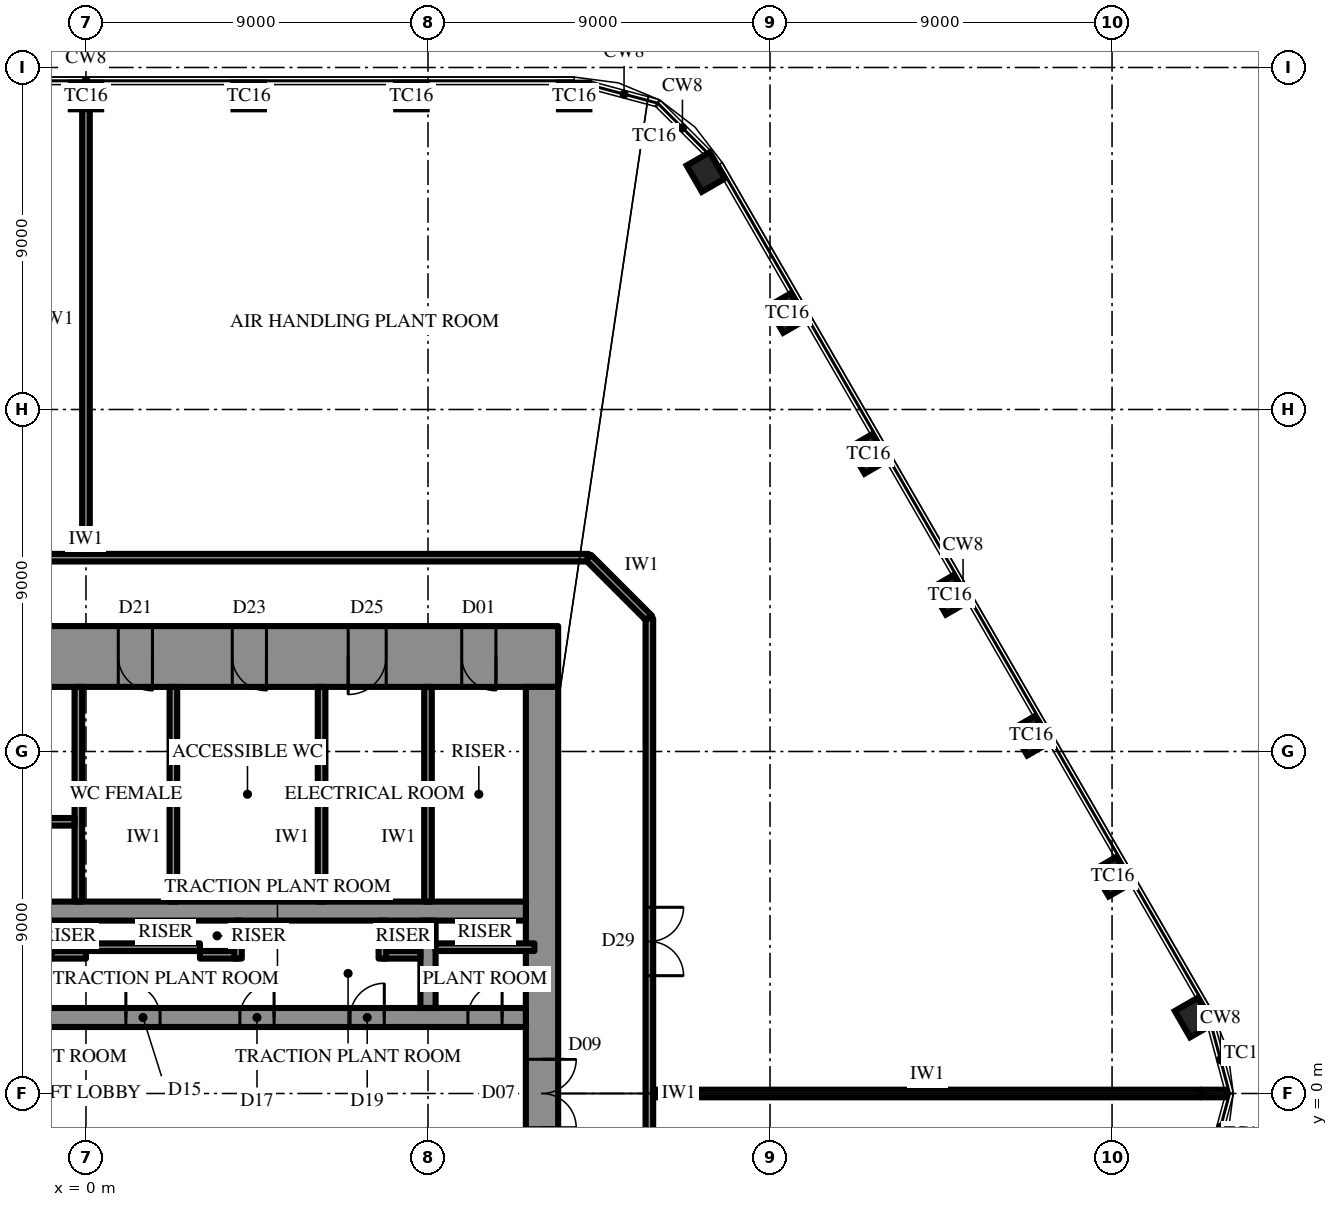
"""IFC4 building model, lengths in metres.
Left out: names, types, materials, properties, quantities, classifications, styles, units other than length and angle.
Written with IfcOpenShell. Run it as: python <this file> out.ifc"""

import sys

from ifc_helpers import new_model, si_unit, direction, frame, frame_2d, origin, origin_2d, place, context, subcontext, project, spatial, rectangle, extrude, element, fill, save


model = new_model("IFC4")
c1 = context("Model", 3, precision=1e-05, world=origin(), true_north=direction((0.0, 1.0)))
c2 = subcontext(c1, "Body", "Model", "MODEL_VIEW")
j1 = project(units=[si_unit("LENGTHUNIT", "METRE"), si_unit("PLANEANGLEUNIT", "RADIAN")], contexts=[c1])
p1 = place(None, origin())
s1 = spatial("IfcSite", under=j1, at=p1, CompositionType="ELEMENT")
p2 = place(p1, origin())
s2 = spatial("IfcBuilding", under=s1, at=p2, CompositionType="ELEMENT")
p3 = place(p2, frame((0.0, 0.0, 396.3)))
s3 = spatial("IfcBuildingStorey", under=s2, at=p3, CompositionType="ELEMENT", Elevation=396.3)
for number, where, z_axis, x_axis in (
    (1, (29.156, 2.0, 0.0), (0.0, 0.0, 1.0), (-0.5, 0.866, 0.0)),
    (2, (27.015, 5.708, 0.0), (0.0, 0.0, 1.0), (-0.5, 0.866, 0.0)),
    (3, (24.874, 9.417, 0.0), (0.0, 0.0, 1.0), (-0.5, 0.866, 0.0)),
    (4, (22.733, 13.125, 0.0), (0.0, 0.0, 1.0), (-0.5, 0.866, 0.0)),
    (5, (20.592, 16.833, 0.0), (0.0, 0.0, 1.0), (-0.5, 0.866, 0.0)),
    (6, (18.451, 20.542, 0.0), (0.0, 0.0, 1.0), (-0.5, 0.866, 0.0)),
    (7, (16.31, 24.25, 0.0), (0.0, 0.0, 1.0), (-0.5, 0.866, 0.0)),
    (8, (12.846, 26.25, 0.0), (0.0, 0.0, 1.0), (-1.0, 0.0, 0.0)),
    (9, (8.564, 26.25, 0.0), (0.0, 0.0, 1.0), (-1.0, 0.0, 0.0)),
    (10, (4.282, 26.25, 0.0), (0.0, 0.0, 1.0), (-1.0, 0.0, 0.0)),
    (11, (0.0, 26.25, 0.0), (0.0, 0.0, 1.0), (-1.0, 0.0, 0.0)),
):
    element("IfcColumn", number, at=place(p3, frame(where, z_axis=z_axis, x_axis=x_axis)), inside=s3, PredefinedType="COLUMN", context=c2, shape_type="SweptSolid", body=[
        extrude(rectangle(XDim=0.8, YDim=0.7, at=origin_2d()), origin(), (0.0, 0.0, 1.0), 6.0),
    ])
p4 = place(p3, frame((-12.425, 11.5, 0.0), z_axis=(0.0, 0.0, 1.0), x_axis=(1.0, 0.0, 0.0)))
e12 = element("IfcWall", 12, at=p4, inside=s3, PredefinedType="SHEAR", context=c2, shape_type="SweptSolid", body=[
    extrude(rectangle(XDim=24.85, YDim=1.6, at=frame_2d((12.425, 0.0))), origin(), (0.0, 0.0, 1.0), 6.0),
])
p5 = place(p4, frame((13.275, 0.0, 0.0)))
e13 = element("IfcOpeningElement", 13, at=p5, cuts=e12, PredefinedType="OPENING", context=c2, shape_type="SweptSolid", body=[
    extrude(rectangle(XDim=0.9, YDim=2.2, at=frame_2d((0.45, 1.1))), frame((0.0, 0.81, 0.0), z_axis=(0.0, -1.0, 0.0), x_axis=(1.0, 0.0, 0.0)), (0.0, 0.0, 1.0), 1.62),
])
p6 = place(p4, frame((16.275, 0.0, 0.0)))
e14 = element("IfcOpeningElement", 14, at=p6, cuts=e12, PredefinedType="OPENING", context=c2, shape_type="SweptSolid", body=[
    extrude(rectangle(XDim=0.9, YDim=2.2, at=frame_2d((0.45, 1.1))), frame((0.0, 0.81, 0.0), z_axis=(0.0, -1.0, 0.0), x_axis=(1.0, 0.0, 0.0)), (0.0, 0.0, 1.0), 1.62),
])
p7 = place(p4, frame((19.325, 0.0, 0.0)))
e15 = element("IfcOpeningElement", 15, at=p7, cuts=e12, PredefinedType="OPENING", context=c2, shape_type="SweptSolid", body=[
    extrude(rectangle(XDim=1.0, YDim=2.2, at=frame_2d((0.5, 1.1))), frame((0.0, 0.81, 0.0), z_axis=(0.0, -1.0, 0.0), x_axis=(1.0, 0.0, 0.0)), (0.0, 0.0, 1.0), 1.62),
])
p8 = place(p4, frame((1.637, 0.0, 0.0)))
e16 = element("IfcOpeningElement", 16, at=p8, cuts=e12, PredefinedType="OPENING", context=c2, shape_type="SweptSolid", body=[
    extrude(rectangle(XDim=0.9, YDim=2.2, at=frame_2d((0.45, 1.1))), frame((0.0, 0.81, 0.0), z_axis=(0.0, -1.0, 0.0), x_axis=(1.0, 0.0, 0.0)), (0.0, 0.0, 1.0), 1.62),
])
p9 = place(p4, frame((22.312, 0.0, 0.0)))
e17 = element("IfcOpeningElement", 17, at=p9, cuts=e12, PredefinedType="OPENING", context=c2, shape_type="SweptSolid", body=[
    extrude(rectangle(XDim=0.9, YDim=2.2, at=frame_2d((0.45, 1.1))), frame((0.0, 0.81, 0.0), z_axis=(0.0, -1.0, 0.0), x_axis=(1.0, 0.0, 0.0)), (0.0, 0.0, 1.0), 1.62),
])
p10 = place(p3, frame((12.0, -10.7, 0.0), z_axis=(0.0, 0.0, 1.0), x_axis=(0.0, 1.0, 0.0)))
e18 = element("IfcWall", 18, at=p10, inside=s3, PredefinedType="SHEAR", context=c2, shape_type="SweptSolid", body=[
    extrude(rectangle(XDim=21.4, YDim=0.85, at=frame_2d((10.7, 0.0))), origin(), (0.0, 0.0, 1.0), 6.0),
])
p11 = place(p10, frame((9.8, 0.0, 0.0)))
e19 = element("IfcOpeningElement", 19, at=p11, cuts=e18, PredefinedType="OPENING", context=c2, shape_type="SweptSolid", body=[
    extrude(rectangle(XDim=1.8, YDim=2.4, at=frame_2d((0.9, 1.2))), frame((0.0, 0.435, 0.0), z_axis=(0.0, -1.0, 0.0), x_axis=(1.0, 0.0, 0.0)), (0.0, 0.0, 1.0), 0.87),
])
p12 = place(p3, frame((-3.2, 2.0, 0.0), z_axis=(0.0, 0.0, 1.0), x_axis=(1.0, 0.0, 0.0)))
e20 = element("IfcWall", 20, at=p12, inside=s3, PredefinedType="SHEAR", context=c2, shape_type="SweptSolid", body=[
    extrude(rectangle(XDim=14.775, YDim=0.5, at=frame_2d((7.387, 0.0))), origin(), (0.0, 0.0, 1.0), 6.0),
])
p13 = place(p12, frame((1.35, 0.0, 0.0)))
e21 = element("IfcOpeningElement", 21, at=p13, cuts=e20, PredefinedType="OPENING", context=c2, shape_type="SweptSolid", body=[
    extrude(rectangle(XDim=0.9, YDim=2.2, at=frame_2d((0.45, 1.1))), frame((0.0, 0.26, 0.0), z_axis=(0.0, -1.0, 0.0), x_axis=(1.0, 0.0, 0.0)), (0.0, 0.0, 1.0), 0.52),
])
p14 = place(p12, frame((4.25, 0.0, 0.0)))
e22 = element("IfcOpeningElement", 22, at=p14, cuts=e20, PredefinedType="OPENING", context=c2, shape_type="SweptSolid", body=[
    extrude(rectangle(XDim=0.9, YDim=2.2, at=frame_2d((0.45, 1.1))), frame((0.0, 0.26, 0.0), z_axis=(0.0, -1.0, 0.0), x_axis=(1.0, 0.0, 0.0)), (0.0, 0.0, 1.0), 0.52),
])
p15 = place(p12, frame((7.25, 0.0, 0.0)))
e23 = element("IfcOpeningElement", 23, at=p15, cuts=e20, PredefinedType="OPENING", context=c2, shape_type="SweptSolid", body=[
    extrude(rectangle(XDim=0.9, YDim=2.2, at=frame_2d((0.45, 1.1))), frame((0.0, 0.26, 0.0), z_axis=(0.0, -1.0, 0.0), x_axis=(1.0, 0.0, 0.0)), (0.0, 0.0, 1.0), 0.52),
])
p16 = place(p12, frame((10.15, 0.0, 0.0)))
e24 = element("IfcOpeningElement", 24, at=p16, cuts=e20, PredefinedType="OPENING", context=c2, shape_type="SweptSolid", body=[
    extrude(rectangle(XDim=0.9, YDim=2.2, at=frame_2d((0.45, 1.1))), frame((0.0, 0.26, 0.0), z_axis=(0.0, -1.0, 0.0), x_axis=(1.0, 0.0, 0.0)), (0.0, 0.0, 1.0), 0.52),
])
p17 = place(p12, frame((13.25, 0.0, 0.0)))
e25 = element("IfcOpeningElement", 25, at=p17, cuts=e20, PredefinedType="OPENING", context=c2, shape_type="SweptSolid", body=[
    extrude(rectangle(XDim=0.9, YDim=2.2, at=frame_2d((0.45, 1.1))), frame((0.0, 0.26, 0.0), z_axis=(0.0, -1.0, 0.0), x_axis=(1.0, 0.0, 0.0)), (0.0, 0.0, 1.0), 0.52),
])
p18 = place(p3, frame((-11.575, 4.8, 0.0), z_axis=(0.0, 0.0, 1.0), x_axis=(1.0, 0.0, 0.0)))
e26 = element("IfcWall", 26, at=p18, inside=s3, PredefinedType="SHEAR", context=c2, shape_type="SweptSolid", body=[
    extrude(rectangle(XDim=23.15, YDim=0.5, at=frame_2d((11.575, 0.0))), origin(), (0.0, 0.0, 1.0), 6.0),
])
p19 = place(p18, frame((6.475, 0.0, 0.0)))
e27 = element("IfcOpeningElement", 27, at=p19, cuts=e26, PredefinedType="OPENING", context=c2, shape_type="SweptSolid", body=[
    extrude(rectangle(XDim=1.2, YDim=2.2, at=frame_2d((0.6, 1.1))), frame((0.0, 0.26, 0.0), z_axis=(0.0, -1.0, 0.0), x_axis=(1.0, 0.0, 0.0)), (0.0, 0.0, 1.0), 0.52),
])
p20 = place(p18, frame((3.475, 0.0, 0.0)))
e28 = element("IfcOpeningElement", 28, at=p20, cuts=e26, PredefinedType="OPENING", context=c2, shape_type="SweptSolid", body=[
    extrude(rectangle(XDim=1.2, YDim=2.2, at=frame_2d((0.6, 1.1))), frame((0.0, 0.26, 0.0), z_axis=(0.0, -1.0, 0.0), x_axis=(1.0, 0.0, 0.0)), (0.0, 0.0, 1.0), 0.52),
])
p21 = place(p3, frame((9.0, 2.25, 0.0), z_axis=(0.0, 0.0, 1.0), x_axis=(0.0, 1.0, 0.0)))
e29 = element("IfcWall", 29, at=p21, inside=s3, PredefinedType="SHEAR", context=c2, shape_type="SweptSolid", body=[
    extrude(rectangle(XDim=2.3, YDim=0.4, at=frame_2d((1.15, 0.0))), origin(), (0.0, 0.0, 1.0), 6.0),
])
p22 = place(p3, frame((-0.2, 5.05, 0.0), z_axis=(0.0, 0.0, 1.0), x_axis=(0.0, 1.0, 0.0)))
e30 = element("IfcWall", 30, at=p22, inside=s3, PredefinedType="SHEAR", context=c2, shape_type="SweptSolid", body=[
    extrude(rectangle(XDim=5.65, YDim=0.2, at=frame_2d((2.825, 0.0))), origin(), (0.0, 0.0, 1.0), 6.0),
])
p23 = place(p3, frame((-8.9, 7.15, 0.0), z_axis=(0.0, 0.0, 1.0), x_axis=(1.0, 0.0, 0.0)))
e31 = element("IfcWall", 31, at=p23, inside=s3, PredefinedType="SHEAR", context=c2, shape_type="SweptSolid", body=[
    extrude(rectangle(XDim=8.6, YDim=0.2, at=frame_2d((4.3, 0.0))), origin(), (0.0, 0.0, 1.0), 6.0),
])
p24 = place(p23, frame((0.3, 0.0, 0.0)))
e32 = element("IfcOpeningElement", 32, at=p24, cuts=e31, PredefinedType="OPENING", context=c2, shape_type="SweptSolid", body=[
    extrude(rectangle(XDim=1.0, YDim=2.2, at=frame_2d((0.5, 1.1))), frame((0.0, 0.11, 0.0), z_axis=(0.0, -1.0, 0.0), x_axis=(1.0, 0.0, 0.0)), (0.0, 0.0, 1.0), 0.22),
])
for number, where, z_axis, x_axis in (
    (33, (9.0, 5.05, 0.0), (0.0, 0.0, 1.0), (0.0, 1.0, 0.0)),
    (34, (2.3, 5.05, 0.0), (0.0, 0.0, 1.0), (0.0, 1.0, 0.0)),
    (35, (6.2, 5.05, 0.0), (0.0, 0.0, 1.0), (0.0, 1.0, 0.0)),
):
    element("IfcWall", number, at=place(p3, frame(where, z_axis=z_axis, x_axis=x_axis)), inside=s3, PredefinedType="PARTITIONING", context=c2, shape_type="SweptSolid", body=[
        extrude(rectangle(XDim=5.65, YDim=0.2, at=frame_2d((2.825, 0.0))), origin(), (0.0, 0.0, 1.0), 5.8),
    ])
p25 = place(p3, frame((-1.0, 3.65, 0.0), z_axis=(0.0, 0.0, 1.0), x_axis=(1.0, 0.0, 0.0)))
e36 = element("IfcWall", 36, at=p25, inside=s3, PredefinedType="PARTITIONING", context=c2, shape_type="SweptSolid", body=[
    extrude(rectangle(XDim=1.0, YDim=0.2, at=frame_2d((0.5, 0.0))), origin(), (0.0, 0.0, 1.0), 5.8),
])
p26 = place(p3, frame((0.0, 3.85, 0.0), z_axis=(0.0, 0.0, 1.0), x_axis=(1.0, 0.0, 0.0)))
e37 = element("IfcWall", 37, at=p26, inside=s3, PredefinedType="PARTITIONING", context=c2, shape_type="SweptSolid", body=[
    extrude(rectangle(XDim=3.0, YDim=0.2, at=frame_2d((1.5, 0.0))), origin(), (0.0, 0.0, 1.0), 5.8),
])
for number, where, z_axis, x_axis in (
    (38, (3.0, 3.65, 0.0), (0.0, 0.0, 1.0), (1.0, 0.0, 0.0)),
    (39, (4.0, 3.55, 0.0), (0.0, 0.0, 1.0), (0.0, 1.0, 0.0)),
    (40, (7.8, 3.65, 0.0), (0.0, 0.0, 1.0), (1.0, 0.0, 0.0)),
    (41, (7.8, 3.55, 0.0), (0.0, 0.0, 1.0), (0.0, 1.0, 0.0)),
):
    element("IfcWall", number, at=place(p3, frame(where, z_axis=z_axis, x_axis=x_axis)), inside=s3, PredefinedType="PARTITIONING", context=c2, shape_type="SweptSolid", body=[
        extrude(rectangle(XDim=1.0, YDim=0.2, at=frame_2d((0.5, 0.0))), origin(), (0.0, 0.0, 1.0), 5.8),
    ])
p27 = place(p3, frame((9.2, 3.85, 0.0), z_axis=(0.0, 0.0, 1.0), x_axis=(1.0, 0.0, 0.0)))
e42 = element("IfcWall", 42, at=p27, inside=s3, PredefinedType="PARTITIONING", context=c2, shape_type="SweptSolid", body=[
    extrude(rectangle(XDim=2.6, YDim=0.2, at=frame_2d((1.3, 0.0))), origin(), (0.0, 0.0, 1.0), 5.8),
])
p28 = place(p3, frame((-13.225, 14.1, 0.0), z_axis=(0.0, 0.0, 1.0), x_axis=(1.0, 0.0, 0.0)))
e43 = element("IfcWall", 43, at=p28, inside=s3, PredefinedType="PARTITIONING", context=c2, shape_type="SweptSolid", body=[
    extrude(rectangle(XDim=26.45, YDim=0.2, at=frame_2d((13.225, 0.0))), origin(), (0.0, 0.0, 1.0), 5.8),
])
p29 = place(p28, frame((6.113, 0.0, 0.0)))
e44 = element("IfcOpeningElement", 44, at=p29, cuts=e43, PredefinedType="OPENING", context=c2, shape_type="SweptSolid", body=[
    extrude(rectangle(XDim=1.0, YDim=2.2, at=frame_2d((0.5, 1.1))), frame((0.0, 0.11, 0.0), z_axis=(0.0, -1.0, 0.0), x_axis=(1.0, 0.0, 0.0)), (0.0, 0.0, 1.0), 0.22),
])
p30 = place(p3, frame((13.225, 14.1, 0.0), z_axis=(0.0, 0.0, 1.0), x_axis=(0.707052830339, -0.707160727918, 0.0)))
e45 = element("IfcWall", 45, at=p30, inside=s3, PredefinedType="PARTITIONING", context=c2, shape_type="SweptSolid", body=[
    extrude(rectangle(XDim=2.263, YDim=0.2, at=frame_2d((1.131, 0.0))), origin(), (0.0, 0.0, 1.0), 5.8),
])
p31 = place(p3, frame((14.825, 12.5, 0.0), z_axis=(0.0, 0.0, 1.0), x_axis=(0.0, -1.0, 0.0)))
e46 = element("IfcWall", 46, at=p31, inside=s3, PredefinedType="PARTITIONING", context=c2, shape_type="SweptSolid", body=[
    extrude(rectangle(XDim=25.0, YDim=0.2, at=frame_2d((12.5, 0.0))), origin(), (0.0, 0.0, 1.0), 5.8),
])
p32 = place(p31, frame((7.6, 0.0, 0.0)))
e47 = element("IfcOpeningElement", 47, at=p32, cuts=e46, PredefinedType="OPENING", context=c2, shape_type="SweptSolid", body=[
    extrude(rectangle(XDim=1.8, YDim=2.4, at=frame_2d((0.9, 1.2))), frame((0.0, 0.11, 0.0), z_axis=(0.0, -1.0, 0.0), x_axis=(1.0, 0.0, 0.0)), (0.0, 0.0, 1.0), 0.22),
])
p33 = place(p31, frame((15.6, 0.0, 0.0)))
e48 = element("IfcOpeningElement", 48, at=p33, cuts=e46, PredefinedType="OPENING", context=c2, shape_type="SweptSolid", body=[
    extrude(rectangle(XDim=1.8, YDim=2.4, at=frame_2d((0.9, 1.2))), frame((0.0, 0.11, 0.0), z_axis=(0.0, -1.0, 0.0), x_axis=(1.0, 0.0, 0.0)), (0.0, 0.0, 1.0), 0.22),
])
p34 = place(p3, frame((0.0, 14.2, 0.0), z_axis=(0.0, 0.0, 1.0), x_axis=(0.0, 1.0, 0.0)))
e49 = element("IfcWall", 49, at=p34, inside=s3, PredefinedType="PARTITIONING", context=c2, shape_type="SweptSolid", body=[
    extrude(rectangle(XDim=12.36, YDim=0.2, at=frame_2d((6.18, 0.0))), origin(), (0.0, 0.0, 1.0), 4.792),
])
p35 = place(p3, frame((14.925, 0.0, 0.0), z_axis=(0.0, 0.0, 1.0), x_axis=(1.0, 0.0, 0.0)))
e50 = element("IfcWall", 50, at=p35, inside=s3, PredefinedType="PARTITIONING", context=c2, shape_type="SweptSolid", body=[
    extrude(rectangle(XDim=14.422, YDim=0.2, at=frame_2d((7.211, 0.0))), origin(), (0.0, 0.0, 1.0), 4.744),
])
p36 = place(p3, frame((29.347, 0.0, 0.0), z_axis=(0.0, 0.0, 1.0), x_axis=(1.0, 0.0, 0.0)))
e51 = element("IfcWall", 51, at=p36, inside=s3, PredefinedType="PARTITIONING", context=c2, shape_type="SweptSolid", body=[
    extrude(rectangle(XDim=0.657, YDim=0.2, at=frame_2d((0.328, 0.0))), origin(), (0.0, 0.0, 1.0), 5.8),
])
p37 = place(p11, frame((1.8, 0.0, 0.0), z_axis=(0.0, 0.0, 1.0), x_axis=(-1.0, 0.0, 0.0)))
e52 = element("IfcDoor", 52, at=p37, inside=s3, OperationType="DOUBLE_DOOR_SINGLE_SWING", PredefinedType="DOOR", context=c2, shape_type="SweptSolid", body=[
    extrude(rectangle(XDim=1.8, YDim=2.4, at=frame_2d((0.9, 1.2))), frame((0.0, 0.025, 0.0), z_axis=(0.0, -1.0, 0.0), x_axis=(1.0, 0.0, 0.0)), (0.0, 0.0, 1.0), 0.05),
])
fill(e19, e52)
p38 = place(p5, frame((0.9, 0.0, 0.0), z_axis=(0.0, 0.0, 1.0), x_axis=(-1.0, 0.0, 0.0)))
e53 = element("IfcDoor", 53, at=p38, inside=s3, OperationType="SINGLE_SWING_RIGHT", PredefinedType="DOOR", context=c2, shape_type="SweptSolid", body=[
    extrude(rectangle(XDim=0.9, YDim=2.2, at=frame_2d((0.45, 1.1))), frame((0.0, 0.025, 0.0), z_axis=(0.0, -1.0, 0.0), x_axis=(1.0, 0.0, 0.0)), (0.0, 0.0, 1.0), 0.05),
])
fill(e13, e53)
p39 = place(p6, frame((0.9, 0.0, 0.0), z_axis=(0.0, 0.0, 1.0), x_axis=(-1.0, 0.0, 0.0)))
e54 = element("IfcDoor", 54, at=p39, inside=s3, OperationType="SINGLE_SWING_RIGHT", PredefinedType="DOOR", context=c2, shape_type="SweptSolid", body=[
    extrude(rectangle(XDim=0.9, YDim=2.2, at=frame_2d((0.45, 1.1))), frame((0.0, 0.025, 0.0), z_axis=(0.0, -1.0, 0.0), x_axis=(1.0, 0.0, 0.0)), (0.0, 0.0, 1.0), 0.05),
])
fill(e14, e54)
p40 = place(p7, frame((1.0, 0.0, 0.0), z_axis=(0.0, 0.0, 1.0), x_axis=(-1.0, 0.0, 0.0)))
e55 = element("IfcDoor", 55, at=p40, inside=s3, OperationType="SINGLE_SWING_LEFT", PredefinedType="DOOR", context=c2, shape_type="SweptSolid", body=[
    extrude(rectangle(XDim=1.0, YDim=2.2, at=frame_2d((0.5, 1.1))), frame((0.0, 0.025, 0.0), z_axis=(0.0, -1.0, 0.0), x_axis=(1.0, 0.0, 0.0)), (0.0, 0.0, 1.0), 0.05),
])
fill(e15, e55)
p41 = place(p9, frame((0.9, 0.0, 0.0), z_axis=(0.0, 0.0, 1.0), x_axis=(-1.0, 0.0, 0.0)))
e56 = element("IfcDoor", 56, at=p41, inside=s3, OperationType="SINGLE_SWING_RIGHT", PredefinedType="DOOR", context=c2, shape_type="SweptSolid", body=[
    extrude(rectangle(XDim=0.9, YDim=2.2, at=frame_2d((0.45, 1.1))), frame((0.0, 0.025, 0.0), z_axis=(0.0, -1.0, 0.0), x_axis=(1.0, 0.0, 0.0)), (0.0, 0.0, 1.0), 0.05),
])
fill(e17, e56)
p42 = place(p14, origin())
e57 = element("IfcDoor", 57, at=p42, inside=s3, OperationType="SINGLE_SWING_RIGHT", PredefinedType="DOOR", context=c2, shape_type="SweptSolid", body=[
    extrude(rectangle(XDim=0.9, YDim=2.2, at=frame_2d((0.45, 1.1))), frame((0.0, 0.025, 0.0), z_axis=(0.0, -1.0, 0.0), x_axis=(1.0, 0.0, 0.0)), (0.0, 0.0, 1.0), 0.05),
])
fill(e22, e57)
p43 = place(p15, origin())
e58 = element("IfcDoor", 58, at=p43, inside=s3, OperationType="SINGLE_SWING_LEFT", PredefinedType="DOOR", context=c2, shape_type="SweptSolid", body=[
    extrude(rectangle(XDim=0.9, YDim=2.2, at=frame_2d((0.45, 1.1))), frame((0.0, 0.025, 0.0), z_axis=(0.0, -1.0, 0.0), x_axis=(1.0, 0.0, 0.0)), (0.0, 0.0, 1.0), 0.05),
])
fill(e23, e58)
p44 = place(p16, origin())
e59 = element("IfcDoor", 59, at=p44, inside=s3, OperationType="SINGLE_SWING_LEFT", PredefinedType="DOOR", context=c2, shape_type="SweptSolid", body=[
    extrude(rectangle(XDim=0.9, YDim=2.2, at=frame_2d((0.45, 1.1))), frame((0.0, 0.025, 0.0), z_axis=(0.0, -1.0, 0.0), x_axis=(1.0, 0.0, 0.0)), (0.0, 0.0, 1.0), 0.05),
])
fill(e24, e59)
p45 = place(p17, origin())
e60 = element("IfcDoor", 60, at=p45, inside=s3, OperationType="SINGLE_SWING_LEFT", PredefinedType="DOOR", context=c2, shape_type="SweptSolid", body=[
    extrude(rectangle(XDim=0.9, YDim=2.2, at=frame_2d((0.45, 1.1))), frame((0.0, 0.025, 0.0), z_axis=(0.0, -1.0, 0.0), x_axis=(1.0, 0.0, 0.0)), (0.0, 0.0, 1.0), 0.05),
])
fill(e25, e60)
p46 = place(p32, origin())
e61 = element("IfcDoor", 61, at=p46, inside=s3, OperationType="DOUBLE_DOOR_SINGLE_SWING", PredefinedType="DOOR", context=c2, shape_type="SweptSolid", body=[
    extrude(rectangle(XDim=1.8, YDim=2.4, at=frame_2d((0.9, 1.2))), frame((0.0, 0.025, 0.0), z_axis=(0.0, -1.0, 0.0), x_axis=(1.0, 0.0, 0.0)), (0.0, 0.0, 1.0), 0.05),
])
fill(e47, e61)
save(model, sys.argv[1])
